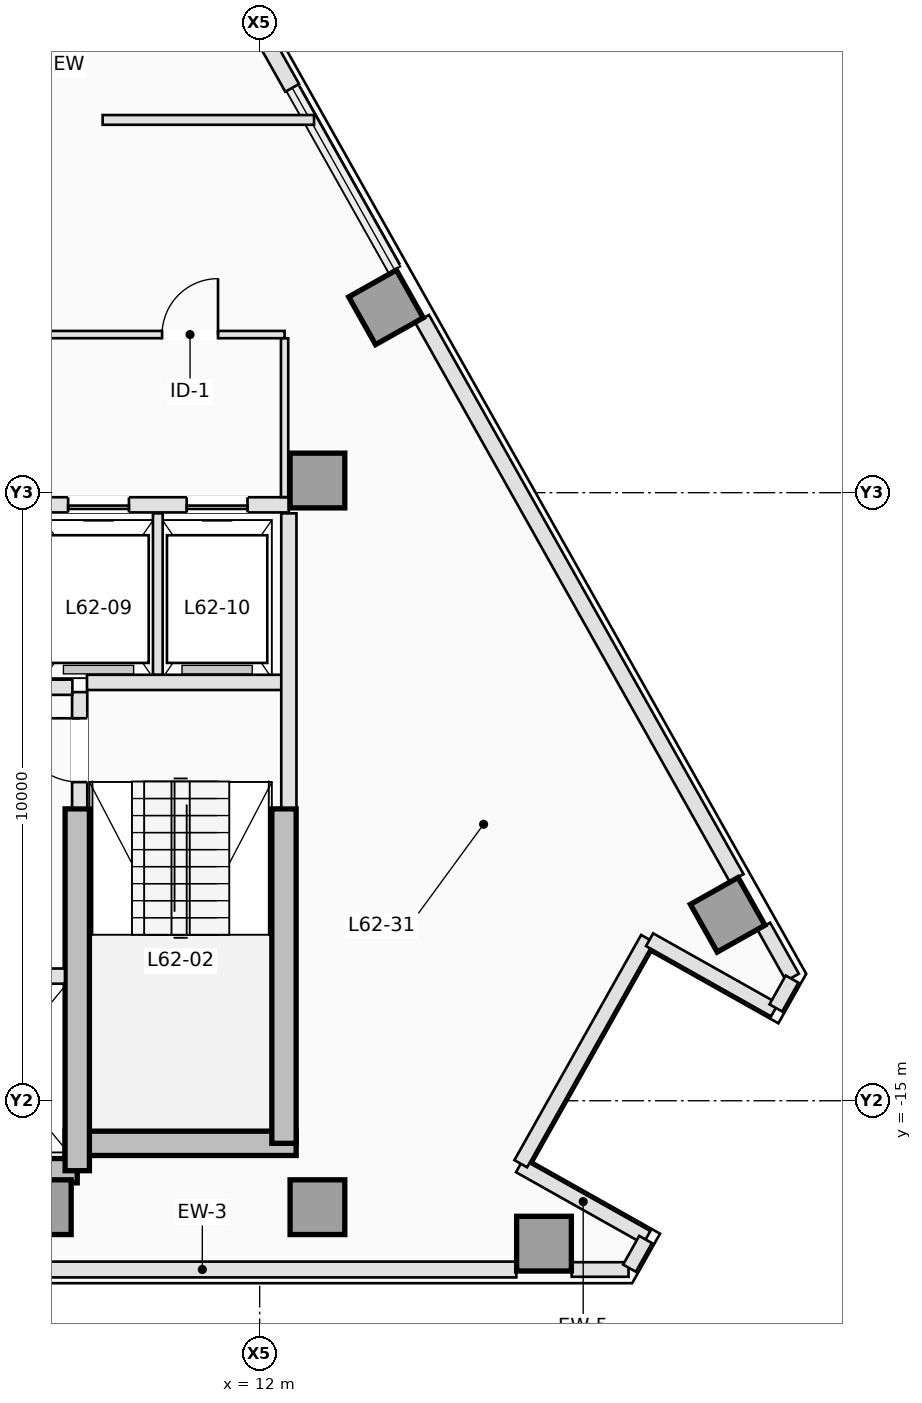
"""IFC4 building model, lengths in metres.
Left out: names, types, materials, properties, quantities, classifications, styles, units other than length and angle.
Written with IfcOpenShell. Run it as: python <this file> out.ifc"""

import sys

from ifc_helpers import new_model, si_unit, direction, frame, frame_2d, origin, origin_2d, place, context, subcontext, project, spatial, rectangle, extrude, element, fill, save


model = new_model("IFC4")
c1 = context("Model", 3, precision=1e-05, world=origin(), true_north=direction((0.0, 1.0)))
c2 = subcontext(c1, "Body", "Model", "MODEL_VIEW")
j1 = project(units=[si_unit("LENGTHUNIT", "METRE"), si_unit("PLANEANGLEUNIT", "RADIAN")], contexts=[c1])
p1 = place(None, origin())
s1 = spatial("IfcSite", under=j1, at=p1, CompositionType="ELEMENT")
p2 = place(p1, origin())
s2 = spatial("IfcBuilding", under=s1, at=p2, CompositionType="ELEMENT")
p3 = place(p2, frame((0.0, 0.0, 225.4)))
s3 = spatial("IfcBuildingStorey", under=s2, at=p3, CompositionType="ELEMENT", Elevation=225.4)
p4 = place(p3, frame((3.75, -16.15, 0.0), z_axis=(0.0, 0.0, 1.0), x_axis=(1.0, 0.0, 0.0)))
e1 = element("IfcWall", 1, at=p4, inside=s3, PredefinedType="SHEAR", context=c2, shape_type="SweptSolid", body=[
    extrude(rectangle(XDim=5.25, YDim=0.4, at=frame_2d((2.625, 0.0))), origin(), (0.0, 0.0, 1.0), 3.5),
])
p5 = place(p3, frame((8.8, -15.7, 0.0), z_axis=(0.0, 0.0, 1.0), x_axis=(1.0, 0.0, 0.0)))
e2 = element("IfcWall", 2, at=p5, inside=s3, PredefinedType="SHEAR", context=c2, shape_type="SweptSolid", body=[
    extrude(rectangle(XDim=3.8, YDim=0.4, at=frame_2d((1.9, 0.0))), origin(), (0.0, 0.0, 1.0), 3.5),
])
p6 = place(p3, frame((12.4, -15.7, 0.0), z_axis=(0.0, 0.0, 1.0), x_axis=(0.0, 1.0, 0.0)))
e3 = element("IfcWall", 3, at=p6, inside=s3, PredefinedType="SHEAR", context=c2, shape_type="SweptSolid", body=[
    extrude(rectangle(XDim=5.5, YDim=0.4, at=frame_2d((2.75, 0.0))), origin(), (0.0, 0.0, 1.0), 3.5),
])
p7 = place(p3, frame((9.0, -16.15, 0.0), z_axis=(0.0, 0.0, 1.0), x_axis=(0.0, 1.0, 0.0)))
e4 = element("IfcWall", 4, at=p7, inside=s3, PredefinedType="SHEAR", context=c2, shape_type="SweptSolid", body=[
    extrude(rectangle(XDim=5.95, YDim=0.4, at=frame_2d((2.975, 0.0))), origin(), (0.0, 0.0, 1.0), 3.5),
])
for number, where, z_axis, x_axis in (
    (5, (8.45, -16.75, 0.0), (0.0, 0.0, 1.0), (1.0, 0.0, 0.0)),
    (6, (12.95, -16.75, 0.0), (0.0, 0.0, 1.0), (1.0, 0.0, 0.0)),
    (7, (12.95, -4.8, 0.0), (0.0, 0.0, 1.0), (1.0, 0.0, 0.0)),
    (8, (16.676, -17.35, 0.0), (0.0, 0.0, 1.0), (0.0, 1.0, 0.0)),
    (9, (19.697, -11.942, 0.0), (0.0, 0.0, 1.0), (0.872, 0.49, 0.0)),
    (10, (14.077, -1.952, 0.0), (0.0, 0.0, 1.0), (0.872, 0.49, 0.0)),
):
    element("IfcColumn", number, at=place(p3, frame(where, z_axis=z_axis, x_axis=x_axis)), inside=s3, PredefinedType="COLUMN", context=c2, shape_type="SweptSolid", body=[
        extrude(rectangle(XDim=0.9, YDim=0.9, at=origin_2d()), origin(), (0.0, 0.0, 1.0), 3.5),
    ])
p8 = place(p3, frame((18.066, -17.775, 0.0), z_axis=(0.0, 0.0, 1.0), x_axis=(-1.0, 0.0, 0.0)))
e11 = element("IfcWall", 11, at=p8, inside=s3, PredefinedType="STANDARD", context=c2, shape_type="SweptSolid", body=[
    extrude(rectangle(XDim=0.935, YDim=0.24, at=frame_2d((0.468, 0.0))), origin(), (0.0, 0.0, 1.0), 3.25),
])
p9 = place(p3, frame((16.221, -17.775, 0.0), z_axis=(0.0, 0.0, 1.0), x_axis=(-1.0, 0.0, 0.0)))
e12 = element("IfcWall", 12, at=p9, inside=s3, PredefinedType="STANDARD", context=c2, shape_type="SweptSolid", body=[
    extrude(rectangle(XDim=10.328, YDim=0.26, at=frame_2d((5.164, 0.0))), origin(), (0.0, 0.0, 1.0), 1.75),
])
p10 = place(p3, frame((20.29, -12.13, 0.0), z_axis=(0.0, 0.0, 1.0), x_axis=(0.490345412687, -0.87152818443, 0.0)))
e13 = element("IfcWall", 13, at=p10, inside=s3, PredefinedType="STANDARD", context=c2, shape_type="SweptSolid", body=[
    extrude(rectangle(XDim=0.964, YDim=0.24, at=frame_2d((0.482, 0.0))), origin(), (0.0, 0.0, 1.0), 3.25),
])
p11 = place(p3, frame((14.671, -2.14, 0.0), z_axis=(0.0, 0.0, 1.0), x_axis=(0.490246958575, -0.871583570066, 0.0)))
e14 = element("IfcWall", 14, at=p11, inside=s3, PredefinedType="STANDARD", context=c2, shape_type="SweptSolid", body=[
    extrude(rectangle(XDim=10.552, YDim=0.26, at=frame_2d((5.276, 0.0))), origin(), (0.0, 0.0, 1.0), 1.75),
])
p12 = place(p3, frame((10.923, 4.522, 0.0), z_axis=(0.0, 0.0, 1.0), x_axis=(0.490264765862, -0.871573553611, 0.0)))
e15 = element("IfcWall", 15, at=p12, inside=s3, PredefinedType="STANDARD", context=c2, shape_type="SweptSolid", body=[
    extrude(rectangle(XDim=3.287, YDim=0.26, at=frame_2d((1.644, 0.0))), origin(), (0.0, 0.0, 1.0), 1.75),
])
p13 = place(p3, frame((18.366, -17.247, 0.0), z_axis=(0.0, 0.0, 1.0), x_axis=(-0.871597270235, 0.490222600988, 0.0)))
e16 = element("IfcWall", 16, at=p13, inside=s3, PredefinedType="STANDARD", context=c2, shape_type="SweptSolid", body=[
    extrude(rectangle(XDim=2.4, YDim=0.24, at=frame_2d((1.2, 0.0))), origin(), (0.0, 0.0, 1.0), 3.25),
])
p14 = place(p3, frame((16.294, -16.035, 0.0), z_axis=(0.0, 0.0, 1.0), x_axis=(0.49027487746, 0.871567865706, 0.0)))
e17 = element("IfcWall", 17, at=p14, inside=s3, PredefinedType="STANDARD", context=c2, shape_type="SweptSolid", body=[
    extrude(rectangle(XDim=4.25, YDim=0.24, at=frame_2d((2.125, 0.0))), origin(), (0.0, 0.0, 1.0), 1.75),
])
p15 = place(p3, frame((18.412, -12.351, 0.0), z_axis=(0.0, 0.0, 1.0), x_axis=(0.871578299909, -0.490256327984, 0.0)))
e18 = element("IfcWall", 18, at=p15, inside=s3, PredefinedType="STANDARD", context=c2, shape_type="SweptSolid", body=[
    extrude(rectangle(XDim=2.36, YDim=0.24, at=frame_2d((1.18, 0.0))), origin(), (0.0, 0.0, 1.0), 3.25),
])
p16 = place(p3, frame((20.489, -13.473, 0.0), z_axis=(0.0, 0.0, 1.0), x_axis=(0.490133374867, 0.87164744871, 0.0)))
e19 = element("IfcWall", 19, at=p16, inside=s3, PredefinedType="STANDARD", context=c2, shape_type="SweptSolid", body=[
    extrude(rectangle(XDim=0.544, YDim=0.24, at=frame_2d((0.272, 0.0))), origin(), (0.0, 0.0, 1.0), 3.25),
])
p17 = place(p3, frame((18.081, -17.753, 0.0), z_axis=(0.0, 0.0, 1.0), x_axis=(0.490582915772, 0.871394516136, 0.0)))
e20 = element("IfcWall", 20, at=p17, inside=s3, PredefinedType="STANDARD", context=c2, shape_type="SweptSolid", body=[
    extrude(rectangle(XDim=0.541, YDim=0.24, at=frame_2d((0.27, 0.0))), origin(), (0.0, 0.0, 1.0), 3.25),
])
p18 = place(p3, frame((9.04, -10.18, 0.0), z_axis=(0.0, 0.0, 1.0), x_axis=(0.0, 1.0, 0.0)))
e21 = element("IfcWall", 21, at=p18, inside=s3, PredefinedType="PARTITIONING", context=c2, shape_type="SweptSolid", body=[
    extrude(rectangle(XDim=1.9, YDim=0.25, at=frame_2d((0.95, 0.0))), origin(), (0.0, 0.0, 1.0), 3.25),
])
p19 = place(p18, frame((0.42, 0.0, 0.0)))
e22 = element("IfcOpeningElement", 22, at=p19, cuts=e21, PredefinedType="OPENING", context=c2, shape_type="SweptSolid", body=[
    extrude(rectangle(XDim=1.05, YDim=2.15, at=frame_2d((0.525, 1.075))), frame((0.0, 0.135, 0.0), z_axis=(0.0, -1.0, 0.0), x_axis=(1.0, 0.0, 0.0)), (0.0, 0.0, 1.0), 0.27),
])
p20 = place(p3, frame((9.16, -8.12, 0.0), z_axis=(0.0, 0.0, 1.0), x_axis=(1.0, 0.0, 0.0)))
e23 = element("IfcWall", 23, at=p20, inside=s3, PredefinedType="PARTITIONING", context=c2, shape_type="SweptSolid", body=[
    extrude(rectangle(XDim=3.22, YDim=0.25, at=frame_2d((1.61, 0.0))), origin(), (0.0, 0.0, 1.0), 3.25),
])
p21 = place(p3, frame((12.48, -10.18, 0.0), z_axis=(0.0, 0.0, 1.0), x_axis=(0.0, 1.0, 0.0)))
e24 = element("IfcWall", 24, at=p21, inside=s3, PredefinedType="PARTITIONING", context=c2, shape_type="SweptSolid", body=[
    extrude(rectangle(XDim=4.84, YDim=0.25, at=frame_2d((2.42, 0.0))), origin(), (0.0, 0.0, 1.0), 3.25),
])
p22 = place(p3, frame((3.68, -12.95, 0.0), z_axis=(0.0, 0.0, 1.0), x_axis=(1.0, 0.0, 0.0)))
e25 = element("IfcWall", 25, at=p22, inside=s3, PredefinedType="PARTITIONING", context=c2, shape_type="SweptSolid", body=[
    extrude(rectangle(XDim=5.118, YDim=0.25, at=frame_2d((2.559, 0.0))), origin(), (0.0, 0.0, 1.0), 3.25),
])
p23 = place(p22, frame((3.32, 0.0, 0.0)))
e26 = element("IfcOpeningElement", 26, at=p23, cuts=e25, PredefinedType="OPENING", context=c2, shape_type="SweptSolid", body=[
    extrude(rectangle(XDim=1.1, YDim=2.15, at=frame_2d((0.55, 1.075))), frame((0.0, 0.135, 0.0), z_axis=(0.0, -1.0, 0.0), x_axis=(1.0, 0.0, 0.0)), (0.0, 0.0, 1.0), 0.27),
])
p24 = place(p22, frame((0.67, 0.0, 0.0)))
e27 = element("IfcOpeningElement", 27, at=p24, cuts=e25, PredefinedType="OPENING", context=c2, shape_type="SweptSolid", body=[
    extrude(rectangle(XDim=1.2, YDim=2.15, at=frame_2d((0.6, 1.075))), frame((0.0, 0.135, 0.0), z_axis=(0.0, -1.0, 0.0), x_axis=(1.0, 0.0, 0.0)), (0.0, 0.0, 1.0), 0.27),
])
p25 = place(p3, frame((3.68, -8.2, 0.0), z_axis=(0.0, 0.0, 1.0), x_axis=(1.0, 0.0, 0.0)))
e28 = element("IfcWall", 28, at=p25, inside=s3, PredefinedType="PARTITIONING", context=c2, shape_type="SweptSolid", body=[
    extrude(rectangle(XDim=5.24, YDim=0.25, at=frame_2d((2.62, 0.0))), origin(), (0.0, 0.0, 1.0), 3.25),
])
p26 = place(p3, frame((4.202, -5.2, 0.0), z_axis=(0.0, 0.0, 1.0), x_axis=(1.0, 0.0, 0.0)))
e29 = element("IfcWall", 29, at=p26, inside=s3, PredefinedType="PARTITIONING", context=c2, shape_type="SweptSolid", body=[
    extrude(rectangle(XDim=8.278, YDim=0.25, at=frame_2d((4.139, 0.0))), origin(), (0.0, 0.0, 1.0), 3.25),
])
p27 = place(p26, frame((0.748, 0.0, 0.0)))
e30 = element("IfcOpeningElement", 30, at=p27, cuts=e29, PredefinedType="OPENING", context=c2, shape_type="SweptSolid", body=[
    extrude(rectangle(XDim=1.0, YDim=2.15, at=frame_2d((0.5, 1.075))), frame((0.0, 0.135, 0.0), z_axis=(0.0, -1.0, 0.0), x_axis=(1.0, 0.0, 0.0)), (0.0, 0.0, 1.0), 0.27),
])
p28 = place(p26, frame((2.698, 0.0, 0.0)))
e31 = element("IfcOpeningElement", 31, at=p28, cuts=e29, PredefinedType="OPENING", context=c2, shape_type="SweptSolid", body=[
    extrude(rectangle(XDim=1.0, YDim=2.15, at=frame_2d((0.5, 1.075))), frame((0.0, 0.135, 0.0), z_axis=(0.0, -1.0, 0.0), x_axis=(1.0, 0.0, 0.0)), (0.0, 0.0, 1.0), 0.27),
])
p29 = place(p26, frame((4.648, 0.0, 0.0)))
e32 = element("IfcOpeningElement", 32, at=p29, cuts=e29, PredefinedType="OPENING", context=c2, shape_type="SweptSolid", body=[
    extrude(rectangle(XDim=1.0, YDim=2.15, at=frame_2d((0.5, 1.075))), frame((0.0, 0.135, 0.0), z_axis=(0.0, -1.0, 0.0), x_axis=(1.0, 0.0, 0.0)), (0.0, 0.0, 1.0), 0.27),
])
p30 = place(p26, frame((6.598, 0.0, 0.0)))
e33 = element("IfcOpeningElement", 33, at=p30, cuts=e29, PredefinedType="OPENING", context=c2, shape_type="SweptSolid", body=[
    extrude(rectangle(XDim=1.0, YDim=2.15, at=frame_2d((0.5, 1.075))), frame((0.0, 0.135, 0.0), z_axis=(0.0, -1.0, 0.0), x_axis=(1.0, 0.0, 0.0)), (0.0, 0.0, 1.0), 0.27),
])
p31 = place(p3, frame((10.325, -7.993, 0.0), z_axis=(0.0, 0.0, 1.0), x_axis=(0.0, 1.0, 0.0)))
e34 = element("IfcWall", 34, at=p31, inside=s3, PredefinedType="PARTITIONING", context=c2, shape_type="SweptSolid", body=[
    extrude(rectangle(XDim=2.653, YDim=0.16, at=frame_2d((1.326, 0.0))), origin(), (0.0, 0.0, 1.0), 3.25),
])
p32 = place(p3, frame((6.512, -2.4, 0.0), z_axis=(0.0, 0.0, 1.0), x_axis=(1.0, 0.0, 0.0)))
e35 = element("IfcWall", 35, at=p32, inside=s3, PredefinedType="PARTITIONING", context=c2, shape_type="SweptSolid", body=[
    extrude(rectangle(XDim=5.898, YDim=0.12, at=frame_2d((2.949, 0.0))), origin(), (0.0, 0.0, 1.0), 3.25),
])
p33 = place(p32, frame((0.458, 0.0, 0.0)))
e36 = element("IfcOpeningElement", 36, at=p33, cuts=e35, PredefinedType="OPENING", context=c2, shape_type="SweptSolid", body=[
    extrude(rectangle(XDim=0.92, YDim=2.12, at=frame_2d((0.46, 1.06))), frame((0.0, 0.07, 0.0), z_axis=(0.0, -1.0, 0.0), x_axis=(1.0, 0.0, 0.0)), (0.0, 0.0, 1.0), 0.14),
])
p34 = place(p32, frame((3.883, 0.0, 0.0)))
e37 = element("IfcOpeningElement", 37, at=p34, cuts=e35, PredefinedType="OPENING", context=c2, shape_type="SweptSolid", body=[
    extrude(rectangle(XDim=0.92, YDim=2.12, at=frame_2d((0.46, 1.06))), frame((0.0, 0.07, 0.0), z_axis=(0.0, -1.0, 0.0), x_axis=(1.0, 0.0, 0.0)), (0.0, 0.0, 1.0), 0.14),
])
p35 = place(p3, frame((12.41, -2.462, 0.0), z_axis=(0.0, 0.0, 1.0), x_axis=(0.0, -1.0, 0.0)))
e38 = element("IfcWall", 38, at=p35, inside=s3, PredefinedType="PARTITIONING", context=c2, shape_type="SweptSolid", body=[
    extrude(rectangle(XDim=2.611, YDim=0.12, at=frame_2d((1.306, 0.0))), origin(), (0.0, 0.0, 1.0), 3.25),
])
p36 = place(p3, frame((12.894, 1.13, 0.0), z_axis=(0.0, 0.0, 1.0), x_axis=(-1.0, 0.0, 0.0)))
e39 = element("IfcWall", 39, at=p36, inside=s3, PredefinedType="PARTITIONING", context=c2, shape_type="SweptSolid", body=[
    extrude(rectangle(XDim=3.476, YDim=0.16, at=frame_2d((1.738, 0.0))), origin(), (0.0, 0.0, 1.0), 3.25),
])
p37 = place(p29, origin())
e40 = element("IfcDoor", 40, at=p37, inside=s3, OperationType="SLIDING_TO_RIGHT", PredefinedType="DOOR", context=c2, shape_type="SweptSolid", body=[
    extrude(rectangle(XDim=1.0, YDim=2.15, at=frame_2d((0.5, 1.075))), frame((0.0, 0.025, 0.0), z_axis=(0.0, -1.0, 0.0), x_axis=(1.0, 0.0, 0.0)), (0.0, 0.0, 1.0), 0.05),
])
fill(e32, e40)
p38 = place(p30, origin())
e41 = element("IfcDoor", 41, at=p38, inside=s3, OperationType="SLIDING_TO_RIGHT", PredefinedType="DOOR", context=c2, shape_type="SweptSolid", body=[
    extrude(rectangle(XDim=1.0, YDim=2.15, at=frame_2d((0.5, 1.075))), frame((0.0, 0.025, 0.0), z_axis=(0.0, -1.0, 0.0), x_axis=(1.0, 0.0, 0.0)), (0.0, 0.0, 1.0), 0.05),
])
fill(e33, e41)
p39 = place(p19, origin())
e42 = element("IfcDoor", 42, at=p39, inside=s3, OperationType="SINGLE_SWING_RIGHT", PredefinedType="DOOR", context=c2, shape_type="SweptSolid", body=[
    extrude(rectangle(XDim=1.05, YDim=2.15, at=frame_2d((0.525, 1.075))), frame((0.0, 0.025, 0.0), z_axis=(0.0, -1.0, 0.0), x_axis=(1.0, 0.0, 0.0)), (0.0, 0.0, 1.0), 0.05),
])
fill(e22, e42)
p40 = place(p34, origin())
e43 = element("IfcDoor", 43, at=p40, inside=s3, OperationType="SINGLE_SWING_RIGHT", PredefinedType="DOOR", context=c2, shape_type="SweptSolid", body=[
    extrude(rectangle(XDim=0.92, YDim=2.12, at=frame_2d((0.46, 1.06))), frame((0.0, 0.025, 0.0), z_axis=(0.0, -1.0, 0.0), x_axis=(1.0, 0.0, 0.0)), (0.0, 0.0, 1.0), 0.05),
])
fill(e37, e43)
save(model, sys.argv[1])
